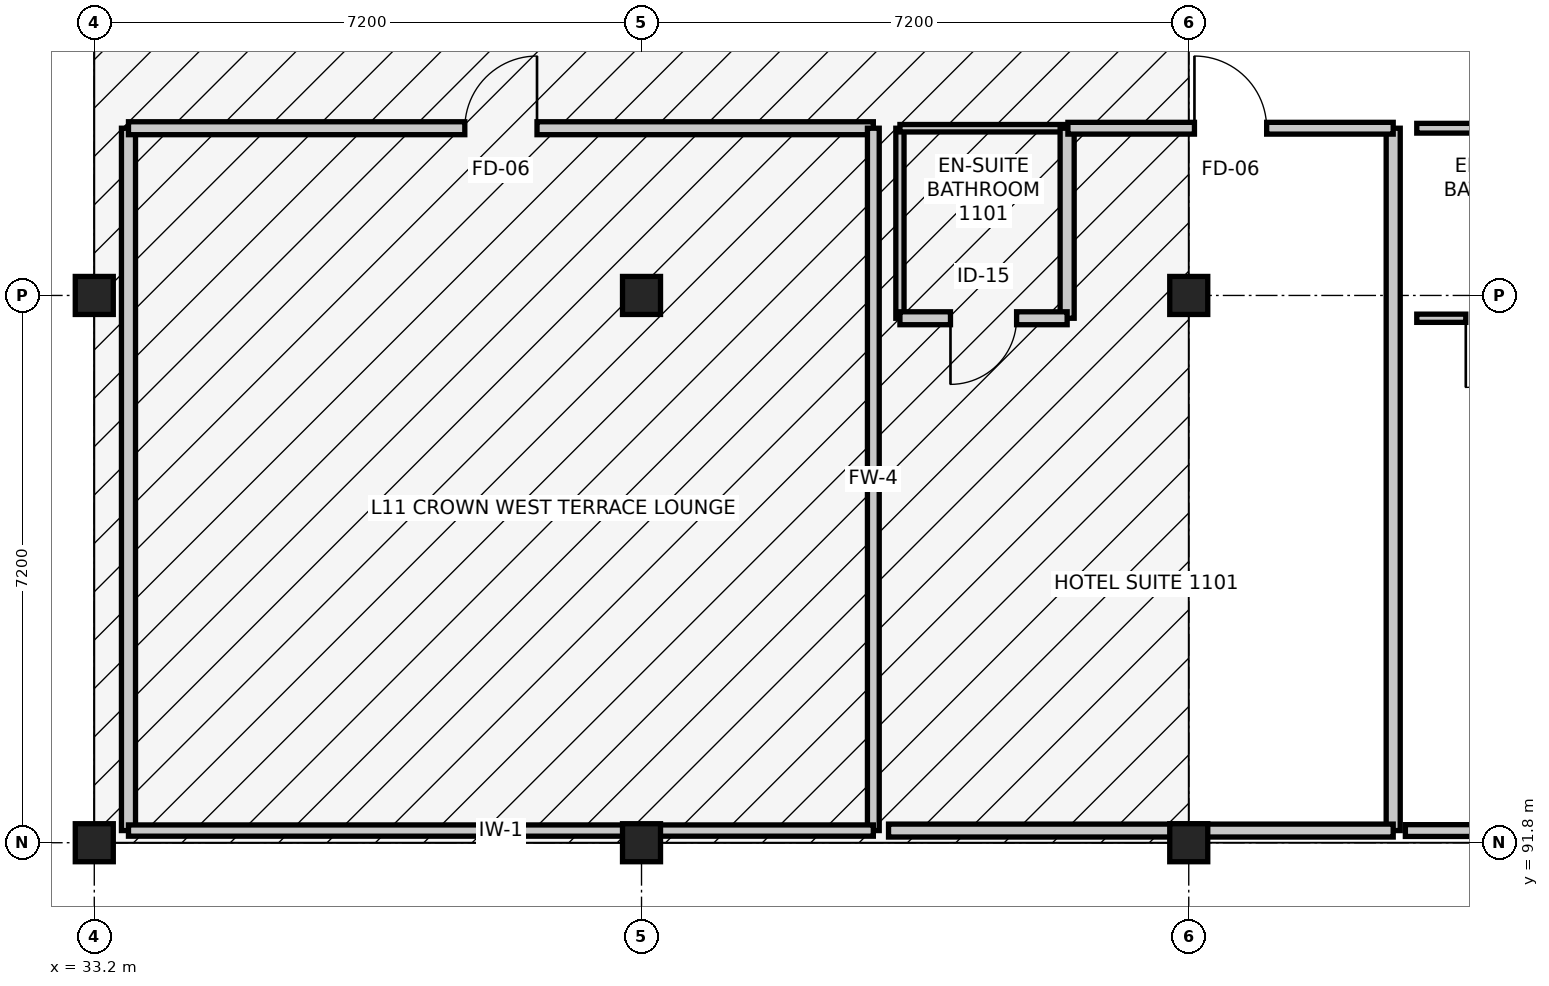
"""IFC4 building model, lengths in metres.
Left out: names, types, materials, properties, quantities, classifications, styles, units other than length and angle.
Written with IfcOpenShell. Run it as: python <this file> out.ifc"""

import sys

from ifc_helpers import new_model, si_unit, direction, frame, frame_2d, origin, origin_2d, place, context, subcontext, project, spatial, rectangle, extrude, element, fill, save


model = new_model("IFC4")
c1 = context("Model", 3, precision=1e-05, world=origin(), true_north=direction((0.0, 1.0)))
c2 = subcontext(c1, "Body", "Model", "MODEL_VIEW")
j1 = project(units=[si_unit("LENGTHUNIT", "METRE"), si_unit("PLANEANGLEUNIT", "RADIAN")], contexts=[c1])
p1 = place(None, origin())
s1 = spatial("IfcSite", under=j1, at=p1, CompositionType="ELEMENT")
p2 = place(p1, origin())
s2 = spatial("IfcBuilding", under=s1, at=p2, CompositionType="ELEMENT")
p3 = place(p2, frame((0.0, 0.0, 44.4)))
s3 = spatial("IfcBuildingStorey", under=s2, at=p3, CompositionType="ELEMENT", Elevation=44.4)
for number, where, z_axis, x_axis in (
    (1, (33.2, 91.8, 0.0), (0.0, 0.0, 1.0), (1.0, 0.0, 0.0)),
    (2, (33.2, 99.0, 0.0), (0.0, 0.0, 1.0), (1.0, 0.0, 0.0)),
):
    element("IfcColumn", number, at=place(p3, frame(where, z_axis=z_axis, x_axis=x_axis)), inside=s3, PredefinedType="COLUMN", context=c2, shape_type="SweptSolid", body=[
        extrude(rectangle(XDim=0.5, YDim=0.5, at=origin_2d()), origin(), (0.0, 0.0, 1.0), 2.9),
    ])
for number, where, z_axis, x_axis in (
    (3, (40.4, 91.8, 0.0), (0.0, 0.0, 1.0), (1.0, 0.0, 0.0)),
    (4, (40.4, 99.0, 0.0), (0.0, 0.0, 1.0), (1.0, 0.0, 0.0)),
):
    element("IfcColumn", number, at=place(p3, frame(where, z_axis=z_axis, x_axis=x_axis)), inside=s3, PredefinedType="COLUMN", context=c2, shape_type="SweptSolid", body=[
        extrude(rectangle(XDim=0.5, YDim=0.5, at=origin_2d()), origin(), (0.0, 0.0, 1.0), 3.475),
    ])
for number, where, z_axis, x_axis in (
    (5, (47.6, 91.8, 0.0), (0.0, 0.0, 1.0), (1.0, 0.0, 0.0)),
    (6, (47.6, 99.0, 0.0), (0.0, 0.0, 1.0), (1.0, 0.0, 0.0)),
):
    element("IfcColumn", number, at=place(p3, frame(where, z_axis=z_axis, x_axis=x_axis)), inside=s3, PredefinedType="COLUMN", context=c2, shape_type="SweptSolid", body=[
        extrude(rectangle(XDim=0.5, YDim=0.5, at=origin_2d()), origin(), (0.0, 0.0, 1.0), 4.2),
    ])
p4 = place(p3, frame((33.65, 91.96, 0.0), z_axis=(0.0, 0.0, 1.0), x_axis=(0.0, 1.0, 0.0)))
e7 = element("IfcWall", 7, at=p4, inside=s3, PredefinedType="PARTITIONING", context=c2, shape_type="SweptSolid", body=[
    extrude(rectangle(XDim=9.24, YDim=0.185, at=frame_2d((4.62, 0.0))), origin(), (0.0, 0.0, 1.0), 2.25),
])
p5 = place(p3, frame((33.65, 101.2, 0.0), z_axis=(0.0, 0.0, 1.0), x_axis=(1.0, 0.0, 0.0)))
e8 = element("IfcWall", 8, at=p5, inside=s3, PredefinedType="PARTITIONING", context=c2, shape_type="SweptSolid", body=[
    extrude(rectangle(XDim=9.8, YDim=0.17, at=frame_2d((4.9, 0.0))), origin(), (0.0, 0.0, 1.0), 2.25),
])
p6 = place(p5, frame((4.425, 0.0, 0.0)))
e9 = element("IfcOpeningElement", 9, at=p6, cuts=e8, PredefinedType="OPENING", context=c2, shape_type="SweptSolid", body=[
    extrude(rectangle(XDim=0.95, YDim=2.1, at=frame_2d((0.475, 1.05))), frame((0.0, 0.095, 0.0), z_axis=(0.0, -1.0, 0.0), x_axis=(1.0, 0.0, 0.0)), (0.0, 0.0, 1.0), 0.19),
])
p7 = place(p3, frame((43.45, 101.2, 0.0), z_axis=(0.0, 0.0, 1.0), x_axis=(0.0, -1.0, 0.0)))
e10 = element("IfcWall", 10, at=p7, inside=s3, PredefinedType="PARTITIONING", context=c2, shape_type="SweptSolid", body=[
    extrude(rectangle(XDim=9.24, YDim=0.155, at=frame_2d((4.62, 0.0))), origin(), (0.0, 0.0, 1.0), 2.25),
])
p8 = place(p3, frame((43.45, 91.96, 0.0), z_axis=(0.0, 0.0, 1.0), x_axis=(-1.0, 0.0, 0.0)))
e11 = element("IfcWall", 11, at=p8, inside=s3, PredefinedType="PARTITIONING", context=c2, shape_type="SweptSolid", body=[
    extrude(rectangle(XDim=9.8, YDim=0.148, at=frame_2d((4.9, 0.0))), origin(), (0.0, 0.0, 1.0), 2.25),
])
p9 = place(p3, frame((43.8, 98.7, 0.0), z_axis=(0.0, 0.0, 1.0), x_axis=(0.0, 1.0, 0.0)))
e12 = element("IfcWall", 12, at=p9, inside=s3, PredefinedType="PARTITIONING", context=c2, shape_type="SweptSolid", body=[
    extrude(rectangle(XDim=2.5, YDim=0.108, at=frame_2d((1.25, 0.0))), origin(), (0.0, 0.0, 1.0), 2.25),
])
p10 = place(p3, frame((43.8, 101.2, 0.0), z_axis=(0.0, 0.0, 1.0), x_axis=(1.0, 0.0, 0.0)))
e13 = element("IfcWall", 13, at=p10, inside=s3, PredefinedType="PARTITIONING", context=c2, shape_type="SweptSolid", body=[
    extrude(rectangle(XDim=2.2, YDim=0.098, at=frame_2d((1.1, 0.0))), origin(), (0.0, 0.0, 1.0), 2.25),
])
p11 = place(p3, frame((46.0, 101.2, 0.0), z_axis=(0.0, 0.0, 1.0), x_axis=(0.0, -1.0, 0.0)))
e14 = element("IfcWall", 14, at=p11, inside=s3, PredefinedType="PARTITIONING", context=c2, shape_type="SweptSolid", body=[
    extrude(rectangle(XDim=2.5, YDim=0.185, at=frame_2d((1.25, 0.0))), origin(), (0.0, 0.0, 1.0), 2.25),
])
p12 = place(p3, frame((46.0, 98.7, 0.0), z_axis=(0.0, 0.0, 1.0), x_axis=(-1.0, 0.0, 0.0)))
e15 = element("IfcWall", 15, at=p12, inside=s3, PredefinedType="PARTITIONING", context=c2, shape_type="SweptSolid", body=[
    extrude(rectangle(XDim=2.2, YDim=0.17, at=frame_2d((1.1, 0.0))), origin(), (0.0, 0.0, 1.0), 2.25),
])
p13 = place(p12, frame((0.665, 0.0, 0.0)))
e16 = element("IfcOpeningElement", 16, at=p13, cuts=e15, PredefinedType="OPENING", context=c2, shape_type="SweptSolid", body=[
    extrude(rectangle(XDim=0.87, YDim=2.07, at=frame_2d((0.435, 1.035))), frame((0.0, 0.095, 0.0), z_axis=(0.0, -1.0, 0.0), x_axis=(1.0, 0.0, 0.0)), (0.0, 0.0, 1.0), 0.19),
])
p14 = place(p3, frame((50.29, 101.2, 0.0), z_axis=(0.0, 0.0, 1.0), x_axis=(0.0, -1.0, 0.0)))
e17 = element("IfcWall", 17, at=p14, inside=s3, PredefinedType="PARTITIONING", context=c2, shape_type="SweptSolid", body=[
    extrude(rectangle(XDim=9.24, YDim=0.185, at=frame_2d((4.62, 0.0))), origin(), (0.0, 0.0, 1.0), 3.335),
])
p15 = place(p3, frame((50.29, 91.96, 0.0), z_axis=(0.0, 0.0, 1.0), x_axis=(-1.0, 0.0, 0.0)))
e18 = element("IfcWall", 18, at=p15, inside=s3, PredefinedType="PARTITIONING", context=c2, shape_type="SweptSolid", body=[
    extrude(rectangle(XDim=6.64, YDim=0.17, at=frame_2d((3.32, 0.0))), origin(), (0.0, 0.0, 1.0), 2.25),
])
p16 = place(p3, frame((46.01, 101.2, 0.0), z_axis=(0.0, 0.0, 1.0), x_axis=(1.0, 0.0, 0.0)))
e19 = element("IfcWall", 19, at=p16, inside=s3, PredefinedType="PARTITIONING", context=c2, shape_type="SweptSolid", body=[
    extrude(rectangle(XDim=4.28, YDim=0.155, at=frame_2d((2.14, 0.0))), origin(), (0.0, 0.0, 1.0), 2.25),
])
p17 = place(p16, frame((1.665, 0.0, 0.0)))
e20 = element("IfcOpeningElement", 20, at=p17, cuts=e19, PredefinedType="OPENING", context=c2, shape_type="SweptSolid", body=[
    extrude(rectangle(XDim=0.95, YDim=2.1, at=frame_2d((0.475, 1.05))), frame((0.0, 0.087, 0.0), z_axis=(0.0, -1.0, 0.0), x_axis=(1.0, 0.0, 0.0)), (0.0, 0.0, 1.0), 0.175),
])
p18 = place(p3, frame((50.6, 101.2, 0.0), z_axis=(0.0, 0.0, 1.0), x_axis=(1.0, 0.0, 0.0)))
e21 = element("IfcWall", 21, at=p18, inside=s3, PredefinedType="PARTITIONING", context=c2, shape_type="SweptSolid", body=[
    extrude(rectangle(XDim=2.2, YDim=0.128, at=frame_2d((1.1, 0.0))), origin(), (0.0, 0.0, 1.0), 3.95),
])
p19 = place(p3, frame((52.8, 98.7, 0.0), z_axis=(0.0, 0.0, 1.0), x_axis=(-1.0, 0.0, 0.0)))
e22 = element("IfcWall", 22, at=p19, inside=s3, PredefinedType="PARTITIONING", context=c2, shape_type="SweptSolid", body=[
    extrude(rectangle(XDim=2.2, YDim=0.108, at=frame_2d((1.1, 0.0))), origin(), (0.0, 0.0, 1.0), 3.95),
])
p20 = place(p19, frame((0.645, 0.0, 0.0)))
e23 = element("IfcOpeningElement", 23, at=p20, cuts=e22, PredefinedType="OPENING", context=c2, shape_type="SweptSolid", body=[
    extrude(rectangle(XDim=0.91, YDim=2.11, at=frame_2d((0.455, 1.055))), frame((0.0, 0.064, 0.0), z_axis=(0.0, -1.0, 0.0), x_axis=(1.0, 0.0, 0.0)), (0.0, 0.0, 1.0), 0.128),
])
p21 = place(p3, frame((57.09, 91.96, 0.0), z_axis=(0.0, 0.0, 1.0), x_axis=(-1.0, 0.0, 0.0)))
e24 = element("IfcWall", 24, at=p21, inside=s3, PredefinedType="PARTITIONING", context=c2, shape_type="SweptSolid", body=[
    extrude(rectangle(XDim=6.64, YDim=0.155, at=frame_2d((3.32, 0.0))), origin(), (0.0, 0.0, 1.0), 3.285),
])
p22 = place(p6, origin())
e25 = element("IfcDoor", 25, at=p22, inside=s3, OperationType="SINGLE_SWING_RIGHT", PredefinedType="DOOR", context=c2, shape_type="SweptSolid", body=[
    extrude(rectangle(XDim=0.95, YDim=2.1, at=frame_2d((0.475, 1.05))), frame((0.0, 0.025, 0.0), z_axis=(0.0, -1.0, 0.0), x_axis=(1.0, 0.0, 0.0)), (0.0, 0.0, 1.0), 0.05),
])
fill(e9, e25)
p23 = place(p13, origin())
e26 = element("IfcDoor", 26, at=p23, inside=s3, OperationType="SINGLE_SWING_RIGHT", PredefinedType="DOOR", context=c2, shape_type="SweptSolid", body=[
    extrude(rectangle(XDim=0.87, YDim=2.07, at=frame_2d((0.435, 1.035))), frame((0.0, 0.025, 0.0), z_axis=(0.0, -1.0, 0.0), x_axis=(1.0, 0.0, 0.0)), (0.0, 0.0, 1.0), 0.05),
])
fill(e16, e26)
p24 = place(p17, origin())
e27 = element("IfcDoor", 27, at=p24, inside=s3, OperationType="SINGLE_SWING_LEFT", PredefinedType="DOOR", context=c2, shape_type="SweptSolid", body=[
    extrude(rectangle(XDim=0.95, YDim=2.1, at=frame_2d((0.475, 1.05))), frame((0.0, 0.025, 0.0), z_axis=(0.0, -1.0, 0.0), x_axis=(1.0, 0.0, 0.0)), (0.0, 0.0, 1.0), 0.05),
])
fill(e20, e27)
p25 = place(p20, origin())
e28 = element("IfcDoor", 28, at=p25, inside=s3, OperationType="SINGLE_SWING_RIGHT", PredefinedType="DOOR", context=c2, shape_type="SweptSolid", body=[
    extrude(rectangle(XDim=0.91, YDim=2.11, at=frame_2d((0.455, 1.055))), frame((0.0, 0.025, 0.0), z_axis=(0.0, -1.0, 0.0), x_axis=(1.0, 0.0, 0.0)), (0.0, 0.0, 1.0), 0.05),
])
fill(e23, e28)
save(model, sys.argv[1])
